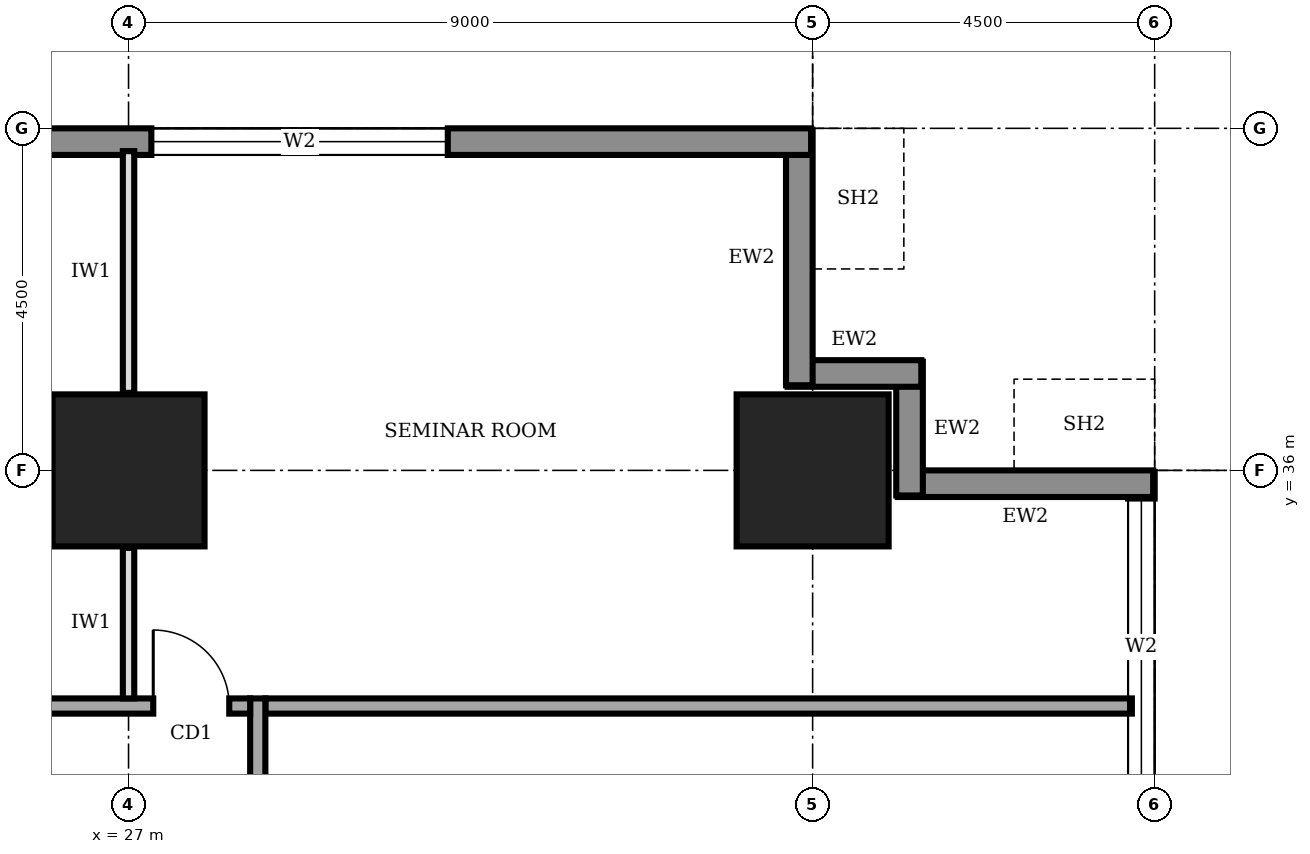
"""IFC4 building model, lengths in metres.
Left out: names, types, materials, properties, quantities, classifications, styles, units other than length and angle.
Written with IfcOpenShell. Run it as: python <this file> out.ifc"""

import sys

from ifc_helpers import new_model, si_unit, direction, frame, frame_2d, origin, origin_2d, place, context, subcontext, project, spatial, rectangle, extrude, element, fill, save


model = new_model("IFC4")
c1 = context("Model", 3, precision=1e-05, world=origin(), true_north=direction((0.0, 1.0)))
c2 = subcontext(c1, "Body", "Model", "MODEL_VIEW")
j1 = project(units=[si_unit("LENGTHUNIT", "METRE"), si_unit("PLANEANGLEUNIT", "RADIAN")], contexts=[c1])
p1 = place(None, origin())
s1 = spatial("IfcSite", under=j1, at=p1, CompositionType="ELEMENT")
p2 = place(p1, origin())
s2 = spatial("IfcBuilding", under=s1, at=p2, CompositionType="ELEMENT")
p3 = place(p2, frame((0.0, 0.0, 57.0)))
s3 = spatial("IfcBuildingStorey", under=s2, at=p3, CompositionType="ELEMENT", Elevation=57.0)
for number, where, z_axis, x_axis in (
    (1, (27.0, 36.0, 0.0), (0.0, 0.0, 1.0), (1.0, 0.0, 0.0)),
    (2, (36.0, 36.0, 0.0), (0.0, 0.0, 1.0), (1.0, 0.0, 0.0)),
):
    element("IfcColumn", number, at=place(p3, frame(where, z_axis=z_axis, x_axis=x_axis)), inside=s3, PredefinedType="COLUMN", context=c2, shape_type="SweptSolid", body=[
        extrude(rectangle(XDim=2.0, YDim=2.0, at=origin_2d()), origin(), (0.0, 0.0, 1.0), 4.0),
    ])
p4 = place(p3, frame((40.325, 4.52, 0.0), z_axis=(0.0, 0.0, 1.0), x_axis=(0.0, 1.0, 0.0)))
e3 = element("IfcWall", 3, at=p4, inside=s3, PredefinedType="STANDARD", context=c2, shape_type="SweptSolid", body=[
    extrude(rectangle(XDim=31.46, YDim=0.35, at=frame_2d((15.73, 0.0))), origin(), (0.0, 0.0, 1.0), 3.75),
])
p5 = place(p4, frame((4.78, 0.0, 0.6)))
e4 = element("IfcOpeningElement", 4, at=p5, cuts=e3, PredefinedType="OPENING", context=c2, shape_type="SweptSolid", body=[
    extrude(rectangle(XDim=3.9, YDim=2.6, at=frame_2d((1.95, 1.3))), frame((0.0, 0.185, 0.0), z_axis=(0.0, -1.0, 0.0), x_axis=(1.0, 0.0, 0.0)), (0.0, 0.0, 1.0), 0.37),
])
p6 = place(p4, frame((9.28, 0.0, 0.6)))
e5 = element("IfcOpeningElement", 5, at=p6, cuts=e3, PredefinedType="OPENING", context=c2, shape_type="SweptSolid", body=[
    extrude(rectangle(XDim=3.9, YDim=2.6, at=frame_2d((1.95, 1.3))), frame((0.0, 0.185, 0.0), z_axis=(0.0, -1.0, 0.0), x_axis=(1.0, 0.0, 0.0)), (0.0, 0.0, 1.0), 0.37),
])
p7 = place(p4, frame((13.78, 0.0, 0.6)))
e6 = element("IfcOpeningElement", 6, at=p7, cuts=e3, PredefinedType="OPENING", context=c2, shape_type="SweptSolid", body=[
    extrude(rectangle(XDim=3.9, YDim=2.6, at=frame_2d((1.95, 1.3))), frame((0.0, 0.185, 0.0), z_axis=(0.0, -1.0, 0.0), x_axis=(1.0, 0.0, 0.0)), (0.0, 0.0, 1.0), 0.37),
])
p8 = place(p4, frame((18.28, 0.0, 0.6)))
e7 = element("IfcOpeningElement", 7, at=p8, cuts=e3, PredefinedType="OPENING", context=c2, shape_type="SweptSolid", body=[
    extrude(rectangle(XDim=3.9, YDim=2.6, at=frame_2d((1.95, 1.3))), frame((0.0, 0.185, 0.0), z_axis=(0.0, -1.0, 0.0), x_axis=(1.0, 0.0, 0.0)), (0.0, 0.0, 1.0), 0.37),
])
p9 = place(p4, frame((22.78, 0.0, 0.6)))
e8 = element("IfcOpeningElement", 8, at=p9, cuts=e3, PredefinedType="OPENING", context=c2, shape_type="SweptSolid", body=[
    extrude(rectangle(XDim=3.9, YDim=2.6, at=frame_2d((1.95, 1.3))), frame((0.0, 0.185, 0.0), z_axis=(0.0, -1.0, 0.0), x_axis=(1.0, 0.0, 0.0)), (0.0, 0.0, 1.0), 0.37),
])
p10 = place(p4, frame((27.21, 0.0, 0.6)))
e9 = element("IfcOpeningElement", 9, at=p10, cuts=e3, PredefinedType="OPENING", context=c2, shape_type="SweptSolid", body=[
    extrude(rectangle(XDim=3.9, YDim=2.6, at=frame_2d((1.95, 1.3))), frame((0.0, 0.185, 0.0), z_axis=(0.0, -1.0, 0.0), x_axis=(1.0, 0.0, 0.0)), (0.0, 0.0, 1.0), 0.37),
])
p11 = place(p3, frame((40.48, 35.825, 0.0), z_axis=(0.0, 0.0, 1.0), x_axis=(-1.0, 0.0, 0.0)))
e10 = element("IfcWall", 10, at=p11, inside=s3, PredefinedType="STANDARD", context=c2, shape_type="SweptSolid", body=[
    extrude(rectangle(XDim=3.36, YDim=0.35, at=frame_2d((1.68, 0.0))), origin(), (0.0, 0.0, 1.0), 2.85),
])
for number, where, z_axis, x_axis in (
    (11, (37.275, 35.67, 0.0), (0.0, 0.0, 1.0), (0.0, 1.0, 0.0)),
    (12, (37.43, 37.275, 0.0), (0.0, 0.0, 1.0), (-1.0, 0.0, 0.0)),
):
    element("IfcWall", number, at=place(p3, frame(where, z_axis=z_axis, x_axis=x_axis)), inside=s3, PredefinedType="STANDARD", context=c2, shape_type="SweptSolid", body=[
        extrude(rectangle(XDim=1.76, YDim=0.35, at=frame_2d((0.88, 0.0))), origin(), (0.0, 0.0, 1.0), 3.75),
    ])
p12 = place(p3, frame((35.825, 37.12, 0.0), z_axis=(0.0, 0.0, 1.0), x_axis=(0.0, 1.0, 0.0)))
e13 = element("IfcWall", 13, at=p12, inside=s3, PredefinedType="STANDARD", context=c2, shape_type="SweptSolid", body=[
    extrude(rectangle(XDim=3.36, YDim=0.35, at=frame_2d((1.68, 0.0))), origin(), (0.0, 0.0, 1.0), 2.85),
])
p13 = place(p3, frame((35.98, 40.325, 0.0), z_axis=(0.0, 0.0, 1.0), x_axis=(-1.0, 0.0, 0.0)))
e14 = element("IfcWall", 14, at=p13, inside=s3, PredefinedType="STANDARD", context=c2, shape_type="SweptSolid", body=[
    extrude(rectangle(XDim=31.46, YDim=0.35, at=frame_2d((15.73, 0.0))), origin(), (0.0, 0.0, 1.0), 3.75),
])
p14 = place(p13, frame((27.21, 0.0, 0.6)))
e15 = element("IfcOpeningElement", 15, at=p14, cuts=e14, PredefinedType="OPENING", context=c2, shape_type="SweptSolid", body=[
    extrude(rectangle(XDim=3.9, YDim=2.6, at=frame_2d((1.95, 1.3))), frame((0.0, 0.185, 0.0), z_axis=(0.0, -1.0, 0.0), x_axis=(1.0, 0.0, 0.0)), (0.0, 0.0, 1.0), 0.37),
])
p15 = place(p13, frame((22.78, 0.0, 0.6)))
e16 = element("IfcOpeningElement", 16, at=p15, cuts=e14, PredefinedType="OPENING", context=c2, shape_type="SweptSolid", body=[
    extrude(rectangle(XDim=3.9, YDim=2.6, at=frame_2d((1.95, 1.3))), frame((0.0, 0.185, 0.0), z_axis=(0.0, -1.0, 0.0), x_axis=(1.0, 0.0, 0.0)), (0.0, 0.0, 1.0), 0.37),
])
p16 = place(p13, frame((4.78, 0.0, 0.6)))
e17 = element("IfcOpeningElement", 17, at=p16, cuts=e14, PredefinedType="OPENING", context=c2, shape_type="SweptSolid", body=[
    extrude(rectangle(XDim=3.9, YDim=2.6, at=frame_2d((1.95, 1.3))), frame((0.0, 0.185, 0.0), z_axis=(0.0, -1.0, 0.0), x_axis=(1.0, 0.0, 0.0)), (0.0, 0.0, 1.0), 0.37),
])
p17 = place(p3, frame((28.7, 9.2, 0.0), z_axis=(0.0, 0.0, 1.0), x_axis=(0.0, 1.0, 0.0)))
e18 = element("IfcWall", 18, at=p17, inside=s3, PredefinedType="SOLIDWALL", context=c2, shape_type="SweptSolid", body=[
    extrude(rectangle(XDim=23.8, YDim=0.2, at=frame_2d((11.9, 0.0))), origin(), (0.0, 0.0, 1.0), 3.75),
])
p18 = place(p17, frame((3.4, 0.0, 0.0)))
e19 = element("IfcOpeningElement", 19, at=p18, cuts=e18, PredefinedType="OPENING", context=c2, shape_type="SweptSolid", body=[
    extrude(rectangle(XDim=1.8, YDim=2.1, at=frame_2d((0.9, 1.05))), frame((0.0, 0.11, 0.0), z_axis=(0.0, -1.0, 0.0), x_axis=(1.0, 0.0, 0.0)), (0.0, 0.0, 1.0), 0.22),
])
p19 = place(p17, frame((10.55, 0.0, 0.0)))
e20 = element("IfcOpeningElement", 20, at=p19, cuts=e18, PredefinedType="OPENING", context=c2, shape_type="SweptSolid", body=[
    extrude(rectangle(XDim=1.0, YDim=2.1, at=frame_2d((0.5, 1.05))), frame((0.0, 0.11, 0.0), z_axis=(0.0, -1.0, 0.0), x_axis=(1.0, 0.0, 0.0)), (0.0, 0.0, 1.0), 0.22),
])
p20 = place(p17, frame((17.65, 0.0, 0.0)))
e21 = element("IfcOpeningElement", 21, at=p20, cuts=e18, PredefinedType="OPENING", context=c2, shape_type="SweptSolid", body=[
    extrude(rectangle(XDim=1.8, YDim=2.1, at=frame_2d((0.9, 1.05))), frame((0.0, 0.11, 0.0), z_axis=(0.0, -1.0, 0.0), x_axis=(1.0, 0.0, 0.0)), (0.0, 0.0, 1.0), 0.22),
])
p21 = place(p3, frame((28.6, 32.9, 0.0), z_axis=(0.0, 0.0, 1.0), x_axis=(-1.0, 0.0, 0.0)))
e22 = element("IfcWall", 22, at=p21, inside=s3, PredefinedType="SOLIDWALL", context=c2, shape_type="SweptSolid", body=[
    extrude(rectangle(XDim=16.9, YDim=0.2, at=frame_2d((8.45, 0.0))), origin(), (0.0, 0.0, 1.0), 3.75),
])
p22 = place(p21, frame((15.425, 0.0, 0.0)))
e23 = element("IfcOpeningElement", 23, at=p22, cuts=e22, PredefinedType="OPENING", context=c2, shape_type="SweptSolid", body=[
    extrude(rectangle(XDim=1.0, YDim=2.1, at=frame_2d((0.5, 1.05))), frame((0.0, 0.11, 0.0), z_axis=(0.0, -1.0, 0.0), x_axis=(1.0, 0.0, 0.0)), (0.0, 0.0, 1.0), 0.22),
])
p23 = place(p21, frame((12.35, 0.0, 0.0)))
e24 = element("IfcOpeningElement", 24, at=p23, cuts=e22, PredefinedType="OPENING", context=c2, shape_type="SweptSolid", body=[
    extrude(rectangle(XDim=1.0, YDim=2.1, at=frame_2d((0.5, 1.05))), frame((0.0, 0.11, 0.0), z_axis=(0.0, -1.0, 0.0), x_axis=(1.0, 0.0, 0.0)), (0.0, 0.0, 1.0), 0.22),
])
p24 = place(p21, frame((5.6, 0.0, 0.0)))
e25 = element("IfcOpeningElement", 25, at=p24, cuts=e22, PredefinedType="OPENING", context=c2, shape_type="SweptSolid", body=[
    extrude(rectangle(XDim=1.0, YDim=2.1, at=frame_2d((0.5, 1.05))), frame((0.0, 0.11, 0.0), z_axis=(0.0, -1.0, 0.0), x_axis=(1.0, 0.0, 0.0)), (0.0, 0.0, 1.0), 0.22),
])
p25 = place(p21, frame((0.275, 0.0, 0.0)))
e26 = element("IfcOpeningElement", 26, at=p25, cuts=e22, PredefinedType="OPENING", context=c2, shape_type="SweptSolid", body=[
    extrude(rectangle(XDim=1.0, YDim=2.1, at=frame_2d((0.5, 1.05))), frame((0.0, 0.11, 0.0), z_axis=(0.0, -1.0, 0.0), x_axis=(1.0, 0.0, 0.0)), (0.0, 0.0, 1.0), 0.22),
])
p26 = place(p3, frame((28.8, 32.9, 0.0), z_axis=(0.0, 0.0, 1.0), x_axis=(1.0, 0.0, 0.0)))
e27 = element("IfcWall", 27, at=p26, inside=s3, PredefinedType="SOLIDWALL", context=c2, shape_type="SweptSolid", body=[
    extrude(rectangle(XDim=11.4, YDim=0.2, at=frame_2d((5.7, 0.0))), origin(), (0.0, 0.0, 1.0), 3.75),
])
p27 = place(p3, frame((27.0, 33.0, 0.0), z_axis=(0.0, 0.0, 1.0), x_axis=(0.0, 1.0, 0.0)))
e28 = element("IfcWall", 28, at=p27, inside=s3, PredefinedType="PARTITIONING", context=c2, shape_type="SweptSolid", body=[
    extrude(rectangle(XDim=1.98, YDim=0.15, at=frame_2d((0.99, 0.0))), origin(), (0.0, 0.0, 1.0), 2.85),
])
p28 = place(p3, frame((27.0, 37.02, 0.0), z_axis=(0.0, 0.0, 1.0), x_axis=(0.0, 1.0, 0.0)))
e29 = element("IfcWall", 29, at=p28, inside=s3, PredefinedType="PARTITIONING", context=c2, shape_type="SweptSolid", body=[
    extrude(rectangle(XDim=3.18, YDim=0.15, at=frame_2d((1.59, 0.0))), origin(), (0.0, 0.0, 1.0), 2.85),
])
p29 = place(p10, origin())
e30 = element("IfcWindow", 30, at=p29, inside=s3, PartitioningType="SINGLE_PANEL", PredefinedType="WINDOW", context=c2, shape_type="SweptSolid", body=[
    extrude(rectangle(XDim=3.9, YDim=2.6, at=frame_2d((1.95, 1.3))), frame((0.0, 0.03, 0.0), z_axis=(0.0, -1.0, 0.0), x_axis=(1.0, 0.0, 0.0)), (0.0, 0.0, 1.0), 0.06),
])
fill(e9, e30)
p30 = place(p16, origin())
e31 = element("IfcWindow", 31, at=p30, inside=s3, PartitioningType="SINGLE_PANEL", PredefinedType="WINDOW", context=c2, shape_type="SweptSolid", body=[
    extrude(rectangle(XDim=3.9, YDim=2.6, at=frame_2d((1.95, 1.3))), frame((0.0, 0.03, 0.0), z_axis=(0.0, -1.0, 0.0), x_axis=(1.0, 0.0, 0.0)), (0.0, 0.0, 1.0), 0.06),
])
fill(e17, e31)
p31 = place(p25, frame((1.0, 0.0, 0.0), z_axis=(0.0, 0.0, 1.0), x_axis=(-1.0, 0.0, 0.0)))
e32 = element("IfcDoor", 32, at=p31, inside=s3, OperationType="SINGLE_SWING_LEFT", PredefinedType="DOOR", context=c2, shape_type="SweptSolid", body=[
    extrude(rectangle(XDim=1.0, YDim=2.1, at=frame_2d((0.5, 1.05))), frame((0.0, 0.025, 0.0), z_axis=(0.0, -1.0, 0.0), x_axis=(1.0, 0.0, 0.0)), (0.0, 0.0, 1.0), 0.05),
])
fill(e26, e32)
save(model, sys.argv[1])
